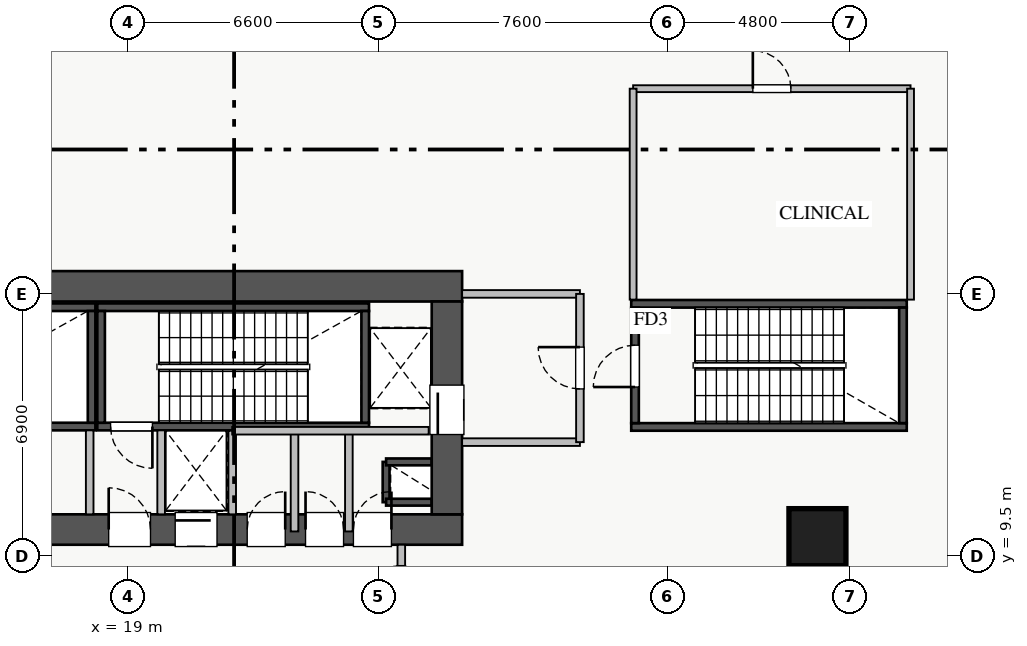
"""IFC4 building model, lengths in metres.
Left out: names, types, materials, properties, quantities, classifications, styles, units other than length and angle.
Written with IfcOpenShell. Run it as: python <this file> out.ifc"""

import sys

from ifc_helpers import new_model, si_unit, direction, frame, frame_2d, origin, origin_2d, place, context, subcontext, project, spatial, rectangle, extrude, source, transform, mapped, element, fill, save


model = new_model("IFC4")
c1 = context("Model", 3, precision=1e-05, world=origin(), true_north=direction((0.0, 1.0)))
c2 = subcontext(c1, "Body", "Model", "MODEL_VIEW")
j1 = project(units=[si_unit("LENGTHUNIT", "METRE"), si_unit("PLANEANGLEUNIT", "RADIAN")], contexts=[c1])
p1 = place(None, origin())
s1 = spatial("IfcSite", under=j1, at=p1, CompositionType="ELEMENT")
p2 = place(p1, origin())
s2 = spatial("IfcBuilding", under=s1, at=p2, CompositionType="ELEMENT")
p3 = place(p2, origin())
s3 = spatial("IfcBuildingStorey", under=s2, at=p3, CompositionType="ELEMENT", Elevation=0.0)
p4 = place(p3, frame((25.8, 10.92, 0.0), z_axis=(0.0, 0.0, 1.0), x_axis=(0.0, 1.0, 0.0)))
e1 = element("IfcWall", 1, at=p4, inside=s3, PredefinedType="SHEAR", context=c2, shape_type="SweptSolid", body=[
    extrude(rectangle(XDim=1.06, YDim=0.18, at=frame_2d((0.53, 0.0))), origin(), (0.0, 0.0, 1.0), 4.78),
])
for number, where, z_axis, x_axis in (
    (2, (25.8, 11.98, 0.0), (0.0, 0.0, 1.0), (1.0, 0.0, 0.0)),
    (3, (25.8, 10.92, 0.0), (0.0, 0.0, 1.0), (1.0, 0.0, 0.0)),
):
    element("IfcWall", number, at=place(p3, frame(where, z_axis=z_axis, x_axis=x_axis)), inside=s3, PredefinedType="SHEAR", context=c2, shape_type="SweptSolid", body=[
        extrude(rectangle(XDim=1.2, YDim=0.18, at=frame_2d((0.6, 0.0))), origin(), (0.0, 0.0, 1.0), 4.78),
    ])
p5 = place(p3, frame((19.88, 12.8, 0.0), z_axis=(0.0, 0.0, 1.0), x_axis=(1.0, 0.0, 0.0)))
e4 = element("IfcWall", 4, at=p5, inside=s3, PredefinedType="SHEAR", context=c2, shape_type="SweptSolid", body=[
    extrude(rectangle(XDim=1.87, YDim=0.18, at=frame_2d((0.935, 0.0))), origin(), (0.0, 0.0, 1.0), 4.78),
])
p6 = place(p3, frame((11.0, 12.91, 0.0), z_axis=(0.0, 0.0, 1.0), x_axis=(1.0, 0.0, 0.0)))
e5 = element("IfcWall", 5, at=p6, inside=s3, PredefinedType="SHEAR", context=c2, shape_type="SweptSolid", body=[
    extrude(rectangle(XDim=7.15, YDim=0.2, at=frame_2d((3.575, 0.0))), origin(), (0.0, 0.0, 1.0), 5.0),
])
p7 = place(p6, frame((0.35, 0.0, 0.0)))
e6 = element("IfcOpeningElement", 6, at=p7, cuts=e5, PredefinedType="OPENING", context=c2, shape_type="SweptSolid", body=[
    extrude(rectangle(XDim=1.1, YDim=2.05, at=frame_2d((0.55, 1.025))), frame((0.0, 0.11, 0.0), z_axis=(0.0, -1.0, 0.0), x_axis=(1.0, 0.0, 0.0)), (0.0, 0.0, 1.0), 0.22),
])
p8 = place(p3, frame((11.0, 16.05, 0.0), z_axis=(0.0, 0.0, 1.0), x_axis=(1.0, 0.0, 0.0)))
e7 = element("IfcWall", 7, at=p8, inside=s3, PredefinedType="SHEAR", context=c2, shape_type="SweptSolid", body=[
    extrude(rectangle(XDim=7.15, YDim=0.2, at=frame_2d((3.575, 0.0))), origin(), (0.0, 0.0, 1.0), 5.0),
])
p9 = place(p3, frame((18.05, 13.01, 0.0), z_axis=(0.0, 0.0, 1.0), x_axis=(0.0, 1.0, 0.0)))
e8 = element("IfcWall", 8, at=p9, inside=s3, PredefinedType="SHEAR", context=c2, shape_type="SweptSolid", body=[
    extrude(rectangle(XDim=2.94, YDim=0.2, at=frame_2d((1.47, 0.0))), origin(), (0.0, 0.0, 1.0), 5.0),
])
p10 = place(p3, frame((18.2, 12.91, 0.0), z_axis=(0.0, 0.0, 1.0), x_axis=(1.0, 0.0, 0.0)))
e9 = element("IfcWall", 9, at=p10, inside=s3, PredefinedType="SHEAR", context=c2, shape_type="SweptSolid", body=[
    extrude(rectangle(XDim=7.15, YDim=0.2, at=frame_2d((3.575, 0.0))), origin(), (0.0, 0.0, 1.0), 5.0),
])
p11 = place(p10, frame((0.35, 0.0, 0.0)))
e10 = element("IfcOpeningElement", 10, at=p11, cuts=e9, PredefinedType="OPENING", context=c2, shape_type="SweptSolid", body=[
    extrude(rectangle(XDim=1.1, YDim=2.05, at=frame_2d((0.55, 1.025))), frame((0.0, 0.11, 0.0), z_axis=(0.0, -1.0, 0.0), x_axis=(1.0, 0.0, 0.0)), (0.0, 0.0, 1.0), 0.22),
])
p12 = place(p3, frame((18.2, 16.05, 0.0), z_axis=(0.0, 0.0, 1.0), x_axis=(1.0, 0.0, 0.0)))
e11 = element("IfcWall", 11, at=p12, inside=s3, PredefinedType="SHEAR", context=c2, shape_type="SweptSolid", body=[
    extrude(rectangle(XDim=7.15, YDim=0.2, at=frame_2d((3.575, 0.0))), origin(), (0.0, 0.0, 1.0), 5.0),
])
for number, where, z_axis, x_axis in (
    (12, (18.3, 13.01, 0.0), (0.0, 0.0, 1.0), (0.0, 1.0, 0.0)),
    (13, (25.25, 13.01, 0.0), (0.0, 0.0, 1.0), (0.0, 1.0, 0.0)),
):
    element("IfcWall", number, at=place(p3, frame(where, z_axis=z_axis, x_axis=x_axis)), inside=s3, PredefinedType="SHEAR", context=c2, shape_type="SweptSolid", body=[
        extrude(rectangle(XDim=2.94, YDim=0.2, at=frame_2d((1.47, 0.0))), origin(), (0.0, 0.0, 1.0), 5.0),
    ])
for number, where, z_axis, x_axis in (
    (14, (32.25, 12.9, 0.0), (0.0, 0.0, 1.0), (1.0, 0.0, 0.0)),
    (15, (32.25, 16.14, 0.0), (0.0, 0.0, 1.0), (1.0, 0.0, 0.0)),
):
    element("IfcWall", number, at=place(p3, frame(where, z_axis=z_axis, x_axis=x_axis)), inside=s3, PredefinedType="SHEAR", context=c2, shape_type="SweptSolid", body=[
        extrude(rectangle(XDim=7.25, YDim=0.2, at=frame_2d((3.625, 0.0))), origin(), (0.0, 0.0, 1.0), 5.0),
    ])
p13 = place(p3, frame((32.35, 13.0, 0.0), z_axis=(0.0, 0.0, 1.0), x_axis=(0.0, 1.0, 0.0)))
e16 = element("IfcWall", 16, at=p13, inside=s3, PredefinedType="SHEAR", context=c2, shape_type="SweptSolid", body=[
    extrude(rectangle(XDim=3.04, YDim=0.2, at=frame_2d((1.52, 0.0))), origin(), (0.0, 0.0, 1.0), 5.0),
])
p14 = place(p13, frame((0.95, 0.0, 0.0)))
e17 = element("IfcOpeningElement", 17, at=p14, cuts=e16, PredefinedType="OPENING", context=c2, shape_type="SweptSolid", body=[
    extrude(rectangle(XDim=1.1, YDim=2.05, at=frame_2d((0.55, 1.025))), frame((0.0, 0.11, 0.0), z_axis=(0.0, -1.0, 0.0), x_axis=(1.0, 0.0, 0.0)), (0.0, 0.0, 1.0), 0.22),
])
p15 = place(p3, frame((39.4, 13.0, 0.0), z_axis=(0.0, 0.0, 1.0), x_axis=(0.0, 1.0, 0.0)))
e18 = element("IfcWall", 18, at=p15, inside=s3, PredefinedType="SHEAR", context=c2, shape_type="SweptSolid", body=[
    extrude(rectangle(XDim=3.04, YDim=0.2, at=frame_2d((1.52, 0.0))), origin(), (0.0, 0.0, 1.0), 5.0),
])
p16 = place(p3, frame((10.2, 10.2, 0.0), z_axis=(0.0, 0.0, 1.0), x_axis=(1.0, 0.0, 0.0)))
e19 = element("IfcWall", 19, at=p16, inside=s3, PredefinedType="SHEAR", context=c2, shape_type="SweptSolid", body=[
    extrude(rectangle(XDim=17.6, YDim=0.8, at=frame_2d((8.8, 0.0))), origin(), (0.0, 0.0, 1.0), 5.0),
])
p17 = place(p16, frame((1.15, 0.0, 0.0)))
e20 = element("IfcOpeningElement", 20, at=p17, cuts=e19, PredefinedType="OPENING", context=c2, shape_type="SweptSolid", body=[
    extrude(rectangle(XDim=1.1, YDim=2.05, at=frame_2d((0.55, 1.025))), frame((0.0, 0.41, 0.0), z_axis=(0.0, -1.0, 0.0), x_axis=(1.0, 0.0, 0.0)), (0.0, 0.0, 1.0), 0.82),
])
p18 = place(p16, frame((8.3, 0.0, 0.0)))
e21 = element("IfcOpeningElement", 21, at=p18, cuts=e19, PredefinedType="OPENING", context=c2, shape_type="SweptSolid", body=[
    extrude(rectangle(XDim=1.1, YDim=2.05, at=frame_2d((0.55, 1.025))), frame((0.0, 0.41, 0.0), z_axis=(0.0, -1.0, 0.0), x_axis=(1.0, 0.0, 0.0)), (0.0, 0.0, 1.0), 0.82),
])
p19 = place(p16, frame((10.05, 0.0, 0.0)))
e22 = element("IfcOpeningElement", 22, at=p19, cuts=e19, PredefinedType="OPENING", context=c2, shape_type="SweptSolid", body=[
    extrude(rectangle(XDim=1.1, YDim=2.05, at=frame_2d((0.55, 1.025))), frame((0.0, 0.41, 0.0), z_axis=(0.0, -1.0, 0.0), x_axis=(1.0, 0.0, 0.0)), (0.0, 0.0, 1.0), 0.82),
])
p20 = place(p16, frame((4.9, 0.0, 0.0)))
e23 = element("IfcOpeningElement", 23, at=p20, cuts=e19, PredefinedType="OPENING", context=c2, shape_type="SweptSolid", body=[
    extrude(rectangle(XDim=1.1, YDim=2.05, at=frame_2d((0.55, 1.025))), frame((0.0, 0.41, 0.0), z_axis=(0.0, -1.0, 0.0), x_axis=(1.0, 0.0, 0.0)), (0.0, 0.0, 1.0), 0.82),
])
p21 = place(p16, frame((2.85, 0.0, 0.0)))
e24 = element("IfcOpeningElement", 24, at=p21, cuts=e19, PredefinedType="OPENING", context=c2, shape_type="SweptSolid", body=[
    extrude(rectangle(XDim=1.1, YDim=2.05, at=frame_2d((0.55, 1.025))), frame((0.0, 0.41, 0.0), z_axis=(0.0, -1.0, 0.0), x_axis=(1.0, 0.0, 0.0)), (0.0, 0.0, 1.0), 0.82),
])
p22 = place(p16, frame((14.74, 0.0, 0.0)))
e25 = element("IfcOpeningElement", 25, at=p22, cuts=e19, PredefinedType="OPENING", context=c2, shape_type="SweptSolid", body=[
    extrude(rectangle(XDim=1.0, YDim=2.05, at=frame_2d((0.5, 1.025))), frame((0.0, 0.41, 0.0), z_axis=(0.0, -1.0, 0.0), x_axis=(1.0, 0.0, 0.0)), (0.0, 0.0, 1.0), 0.82),
])
p23 = place(p16, frame((11.945, 0.0, 0.0)))
e26 = element("IfcOpeningElement", 26, at=p23, cuts=e19, PredefinedType="OPENING", context=c2, shape_type="SweptSolid", body=[
    extrude(rectangle(XDim=1.0, YDim=2.05, at=frame_2d((0.5, 1.025))), frame((0.0, 0.41, 0.0), z_axis=(0.0, -1.0, 0.0), x_axis=(1.0, 0.0, 0.0)), (0.0, 0.0, 1.0), 0.82),
])
p24 = place(p16, frame((13.48, 0.0, 0.0)))
e27 = element("IfcOpeningElement", 27, at=p24, cuts=e19, PredefinedType="OPENING", context=c2, shape_type="SweptSolid", body=[
    extrude(rectangle(XDim=1.0, YDim=2.05, at=frame_2d((0.5, 1.025))), frame((0.0, 0.41, 0.0), z_axis=(0.0, -1.0, 0.0), x_axis=(1.0, 0.0, 0.0)), (0.0, 0.0, 1.0), 0.82),
])
p25 = place(p3, frame((10.2, 16.6, 0.0), z_axis=(0.0, 0.0, 1.0), x_axis=(1.0, 0.0, 0.0)))
e28 = element("IfcWall", 28, at=p25, inside=s3, PredefinedType="SHEAR", context=c2, shape_type="SweptSolid", body=[
    extrude(rectangle(XDim=17.6, YDim=0.8, at=frame_2d((8.8, 0.0))), origin(), (0.0, 0.0, 1.0), 5.0),
])
p26 = place(p3, frame((27.4, 10.6, 0.0), z_axis=(0.0, 0.0, 1.0), x_axis=(0.0, 1.0, 0.0)))
e29 = element("IfcWall", 29, at=p26, inside=s3, PredefinedType="SHEAR", context=c2, shape_type="SweptSolid", body=[
    extrude(rectangle(XDim=5.6, YDim=0.8, at=frame_2d((2.8, 0.0))), origin(), (0.0, 0.0, 1.0), 5.0),
])
p27 = place(p26, frame((2.1, 0.0, 0.0)))
e30 = element("IfcOpeningElement", 30, at=p27, cuts=e29, PredefinedType="OPENING", context=c2, shape_type="SweptSolid", body=[
    extrude(rectangle(XDim=1.3, YDim=2.05, at=frame_2d((0.65, 1.025))), frame((0.0, 0.41, 0.0), z_axis=(0.0, -1.0, 0.0), x_axis=(1.0, 0.0, 0.0)), (0.0, 0.0, 1.0), 0.82),
])
m1 = source(origin(), c2, "Body", "SweptSolid", [
    extrude(rectangle(XDim=1.5, YDim=1.5, at=origin_2d()), origin(), (0.0, 0.0, 1.0), 5.0),
])
p28 = place(p3, frame((37.15, 10.0, 0.0), z_axis=(0.0, 0.0, 1.0), x_axis=(1.0, 0.0, 0.0)))
e31 = element("IfcColumn", 31, at=p28, inside=s3, PredefinedType="COLUMN", context=c2, shape_type="MappedRepresentation", body=[
    mapped(m1, transform((0.0, 0.0, 0.0), x_axis=(1.0, 0.0, 0.0), y_axis=(0.0, 1.0, 0.0), z_axis=(0.0, 0.0, 1.0), scale=1.0)),
])
p29 = place(p3, frame((27.8, 16.4, 0.0), z_axis=(0.0, 0.0, 1.0), x_axis=(1.0, 0.0, 0.0)))
e32 = element("IfcWall", 32, at=p29, inside=s3, PredefinedType="PARTITIONING", context=c2, shape_type="SweptSolid", body=[
    extrude(rectangle(XDim=3.1, YDim=0.2, at=frame_2d((1.55, 0.0))), origin(), (0.0, 0.0, 1.0), 4.075),
])
p30 = place(p3, frame((27.8, 12.5, 0.0), z_axis=(0.0, 0.0, 1.0), x_axis=(1.0, 0.0, 0.0)))
e33 = element("IfcWall", 33, at=p30, inside=s3, PredefinedType="PARTITIONING", context=c2, shape_type="SweptSolid", body=[
    extrude(rectangle(XDim=3.1, YDim=0.2, at=frame_2d((1.55, 0.0))), origin(), (0.0, 0.0, 1.0), 3.775),
])
p31 = place(p3, frame((30.9, 12.5, 0.0), z_axis=(0.0, 0.0, 1.0), x_axis=(0.0, 1.0, 0.0)))
e34 = element("IfcWall", 34, at=p31, inside=s3, PredefinedType="PARTITIONING", context=c2, shape_type="SweptSolid", body=[
    extrude(rectangle(XDim=3.9, YDim=0.2, at=frame_2d((1.95, 0.0))), origin(), (0.0, 0.0, 1.0), 4.78),
])
p32 = place(p31, frame((1.4, 0.0, 0.0)))
e35 = element("IfcOpeningElement", 35, at=p32, cuts=e34, PredefinedType="OPENING", context=c2, shape_type="SweptSolid", body=[
    extrude(rectangle(XDim=1.1, YDim=2.05, at=frame_2d((0.55, 1.025))), frame((0.0, 0.11, 0.0), z_axis=(0.0, -1.0, 0.0), x_axis=(1.0, 0.0, 0.0)), (0.0, 0.0, 1.0), 0.22),
])
for number, where, z_axis, x_axis in (
    (36, (18.0, 10.6, 0.0), (0.0, 0.0, 1.0), (0.0, 1.0, 0.0)),
    (37, (19.88, 10.6, 0.0), (0.0, 0.0, 1.0), (0.0, 1.0, 0.0)),
):
    element("IfcWall", number, at=place(p3, frame(where, z_axis=z_axis, x_axis=x_axis)), inside=s3, PredefinedType="PARTITIONING", context=c2, shape_type="SweptSolid", body=[
        extrude(rectangle(XDim=2.21, YDim=0.2, at=frame_2d((1.105, 0.0))), origin(), (0.0, 0.0, 1.0), 4.78),
    ])
p33 = place(p3, frame((24.82, 10.15, 0.0), z_axis=(0.0, 0.0, 1.0), x_axis=(0.0, 1.0, 0.0)))
e38 = element("IfcWall", 38, at=p33, inside=s3, PredefinedType="PARTITIONING", context=c2, shape_type="SweptSolid", body=[
    extrude(rectangle(XDim=2.65, YDim=0.2, at=frame_2d((1.325, 0.0))), origin(), (0.0, 0.0, 1.0), 4.78),
])
p34 = place(p3, frame((21.75, 10.6, 0.0), z_axis=(0.0, 0.0, 1.0), x_axis=(0.0, 1.0, 0.0)))
e39 = element("IfcWall", 39, at=p34, inside=s3, PredefinedType="PARTITIONING", context=c2, shape_type="SweptSolid", body=[
    extrude(rectangle(XDim=2.2, YDim=0.2, at=frame_2d((1.1, 0.0))), origin(), (0.0, 0.0, 1.0), 4.78),
])
p35 = place(p3, frame((23.39, 10.15, 0.0), z_axis=(0.0, 0.0, 1.0), x_axis=(0.0, 1.0, 0.0)))
e40 = element("IfcWall", 40, at=p35, inside=s3, PredefinedType="PARTITIONING", context=c2, shape_type="SweptSolid", body=[
    extrude(rectangle(XDim=2.65, YDim=0.2, at=frame_2d((1.325, 0.0))), origin(), (0.0, 0.0, 1.0), 4.78),
])
p36 = place(p3, frame((21.75, 12.8, 0.0), z_axis=(0.0, 0.0, 1.0), x_axis=(1.0, 0.0, 0.0)))
e41 = element("IfcWall", 41, at=p36, inside=s3, PredefinedType="PARTITIONING", context=c2, shape_type="SweptSolid", body=[
    extrude(rectangle(XDim=5.17, YDim=0.2, at=frame_2d((2.585, 0.0))), origin(), (0.0, 0.0, 1.0), 4.78),
])
p37 = place(p3, frame((26.2, 7.8, 0.0), z_axis=(0.0, 0.0, 1.0), x_axis=(0.0, 1.0, 0.0)))
e42 = element("IfcWall", 42, at=p37, inside=s3, PredefinedType="PARTITIONING", context=c2, shape_type="SweptSolid", body=[
    extrude(rectangle(XDim=2.0, YDim=0.2, at=frame_2d((1.0, 0.0))), origin(), (0.0, 0.0, 1.0), 4.78),
])
p38 = place(p37, frame((0.35, 0.0, 0.0)))
e43 = element("IfcOpeningElement", 43, at=p38, cuts=e42, PredefinedType="OPENING", context=c2, shape_type="SweptSolid", body=[
    extrude(rectangle(XDim=1.1, YDim=2.05, at=frame_2d((0.55, 1.025))), frame((0.0, 0.11, 0.0), z_axis=(0.0, -1.0, 0.0), x_axis=(1.0, 0.0, 0.0)), (0.0, 0.0, 1.0), 0.22),
])
p39 = place(p3, frame((32.3, 21.8, 0.0), z_axis=(0.0, 0.0, 1.0), x_axis=(1.0, 0.0, 0.0)))
e44 = element("IfcWall", 44, at=p39, inside=s3, PredefinedType="PARTITIONING", context=c2, shape_type="SweptSolid", body=[
    extrude(rectangle(XDim=7.3, YDim=0.18, at=frame_2d((3.65, 0.0))), origin(), (0.0, 0.0, 1.0), 4.78),
])
p40 = place(p39, frame((3.15, 0.0, 0.0)))
e45 = element("IfcOpeningElement", 45, at=p40, cuts=e44, PredefinedType="OPENING", context=c2, shape_type="SweptSolid", body=[
    extrude(rectangle(XDim=1.0, YDim=2.05, at=frame_2d((0.5, 1.025))), frame((0.0, 0.1, 0.0), z_axis=(0.0, -1.0, 0.0), x_axis=(1.0, 0.0, 0.0)), (0.0, 0.0, 1.0), 0.2),
])
for number, where, z_axis, x_axis in (
    (46, (32.3, 16.25, 0.0), (0.0, 0.0, 1.0), (0.0, 1.0, 0.0)),
    (47, (39.6, 16.25, 0.0), (0.0, 0.0, 1.0), (0.0, 1.0, 0.0)),
):
    element("IfcWall", number, at=place(p3, frame(where, z_axis=z_axis, x_axis=x_axis)), inside=s3, PredefinedType="PARTITIONING", context=c2, shape_type="SweptSolid", body=[
        extrude(rectangle(XDim=5.55, YDim=0.18, at=frame_2d((2.775, 0.0))), origin(), (0.0, 0.0, 1.0), 4.78),
    ])
m2 = source(origin(), c2, "Body", "SweptSolid", [
    extrude(rectangle(XDim=1.3, YDim=2.05, at=frame_2d((0.65, 1.025))), frame((0.0, 0.025, 0.0), z_axis=(0.0, -1.0, 0.0), x_axis=(1.0, 0.0, 0.0)), (0.0, 0.0, 1.0), 0.05),
])
p41 = place(p27, origin())
e48 = element("IfcDoor", 48, at=p41, inside=s3, OperationType="SLIDING_TO_RIGHT", PredefinedType="DOOR", context=c2, shape_type="MappedRepresentation", body=[
    mapped(m2, transform((0.0, 0.0, 0.0), x_axis=(1.0, 0.0, 0.0), y_axis=(0.0, 1.0, 0.0), z_axis=(0.0, 0.0, 1.0), scale=1.0)),
])
fill(e30, e48)
m3 = source(origin(), c2, "Body", "SweptSolid", [
    extrude(rectangle(XDim=1.1, YDim=2.05, at=frame_2d((0.55, 1.025))), frame((0.0, 0.025, 0.0), z_axis=(0.0, -1.0, 0.0), x_axis=(1.0, 0.0, 0.0)), (0.0, 0.0, 1.0), 0.05),
])
p42 = place(p18, origin())
e49 = element("IfcDoor", 49, at=p42, inside=s3, OperationType="SINGLE_SWING_LEFT", PredefinedType="DOOR", context=c2, shape_type="MappedRepresentation", body=[
    mapped(m3, transform((0.0, 0.0, 0.0), x_axis=(1.0, 0.0, 0.0), y_axis=(0.0, 1.0, 0.0), z_axis=(0.0, 0.0, 1.0), scale=1.0)),
])
fill(e21, e49)
p43 = place(p11, frame((1.1, 0.0, 0.0), z_axis=(0.0, 0.0, 1.0), x_axis=(-1.0, 0.0, 0.0)))
e50 = element("IfcDoor", 50, at=p43, inside=s3, OperationType="SINGLE_SWING_RIGHT", PredefinedType="DOOR", context=c2, shape_type="MappedRepresentation", body=[
    mapped(m3, transform((0.0, 0.0, 0.0), x_axis=(1.0, 0.0, 0.0), y_axis=(0.0, 1.0, 0.0), z_axis=(0.0, 0.0, 1.0), scale=1.0)),
])
fill(e10, e50)
p44 = place(p19, origin())
e51 = element("IfcDoor", 51, at=p44, inside=s3, OperationType="SLIDING_TO_RIGHT", PredefinedType="DOOR", context=c2, shape_type="MappedRepresentation", body=[
    mapped(m3, transform((0.0, 0.0, 0.0), x_axis=(1.0, 0.0, 0.0), y_axis=(0.0, 1.0, 0.0), z_axis=(0.0, 0.0, 1.0), scale=1.0)),
])
fill(e22, e51)
m4 = source(origin(), c2, "Body", "SweptSolid", [
    extrude(rectangle(XDim=1.0, YDim=2.05, at=frame_2d((0.5, 1.025))), frame((0.0, 0.025, 0.0), z_axis=(0.0, -1.0, 0.0), x_axis=(1.0, 0.0, 0.0)), (0.0, 0.0, 1.0), 0.05),
])
p45 = place(p22, origin())
e52 = element("IfcDoor", 52, at=p45, inside=s3, OperationType="SINGLE_SWING_RIGHT", PredefinedType="DOOR", context=c2, shape_type="MappedRepresentation", body=[
    mapped(m4, transform((0.0, 0.0, 0.0), x_axis=(1.0, 0.0, 0.0), y_axis=(0.0, 1.0, 0.0), z_axis=(0.0, 0.0, 1.0), scale=1.0)),
])
fill(e25, e52)
p46 = place(p23, origin())
e53 = element("IfcDoor", 53, at=p46, inside=s3, OperationType="SINGLE_SWING_RIGHT", PredefinedType="DOOR", context=c2, shape_type="MappedRepresentation", body=[
    mapped(m4, transform((0.0, 0.0, 0.0), x_axis=(1.0, 0.0, 0.0), y_axis=(0.0, 1.0, 0.0), z_axis=(0.0, 0.0, 1.0), scale=1.0)),
])
fill(e26, e53)
p47 = place(p24, origin())
e54 = element("IfcDoor", 54, at=p47, inside=s3, OperationType="SINGLE_SWING_LEFT", PredefinedType="DOOR", context=c2, shape_type="MappedRepresentation", body=[
    mapped(m4, transform((0.0, 0.0, 0.0), x_axis=(1.0, 0.0, 0.0), y_axis=(0.0, 1.0, 0.0), z_axis=(0.0, 0.0, 1.0), scale=1.0)),
])
fill(e27, e54)
p48 = place(p14, origin())
e55 = element("IfcDoor", 55, at=p48, inside=s3, OperationType="SINGLE_SWING_LEFT", PredefinedType="DOOR", context=c2, shape_type="MappedRepresentation", body=[
    mapped(m3, transform((0.0, 0.0, 0.0), x_axis=(1.0, 0.0, 0.0), y_axis=(0.0, 1.0, 0.0), z_axis=(0.0, 0.0, 1.0), scale=1.0)),
])
fill(e17, e55)
p49 = place(p32, origin())
e56 = element("IfcDoor", 56, at=p49, inside=s3, OperationType="SINGLE_SWING_RIGHT", PredefinedType="DOOR", context=c2, shape_type="MappedRepresentation", body=[
    mapped(m3, transform((0.0, 0.0, 0.0), x_axis=(1.0, 0.0, 0.0), y_axis=(0.0, 1.0, 0.0), z_axis=(0.0, 0.0, 1.0), scale=1.0)),
])
fill(e35, e56)
p50 = place(p38, origin())
e57 = element("IfcDoor", 57, at=p50, inside=s3, OperationType="SINGLE_SWING_LEFT", PredefinedType="DOOR", context=c2, shape_type="MappedRepresentation", body=[
    mapped(m3, transform((0.0, 0.0, 0.0), x_axis=(1.0, 0.0, 0.0), y_axis=(0.0, 1.0, 0.0), z_axis=(0.0, 0.0, 1.0), scale=1.0)),
])
fill(e43, e57)
p51 = place(p40, origin())
e58 = element("IfcDoor", 58, at=p51, inside=s3, OperationType="SINGLE_SWING_LEFT", PredefinedType="DOOR", context=c2, shape_type="MappedRepresentation", body=[
    mapped(m4, transform((0.0, 0.0, 0.0), x_axis=(1.0, 0.0, 0.0), y_axis=(0.0, 1.0, 0.0), z_axis=(0.0, 0.0, 1.0), scale=1.0)),
])
fill(e45, e58)
save(model, sys.argv[1])
